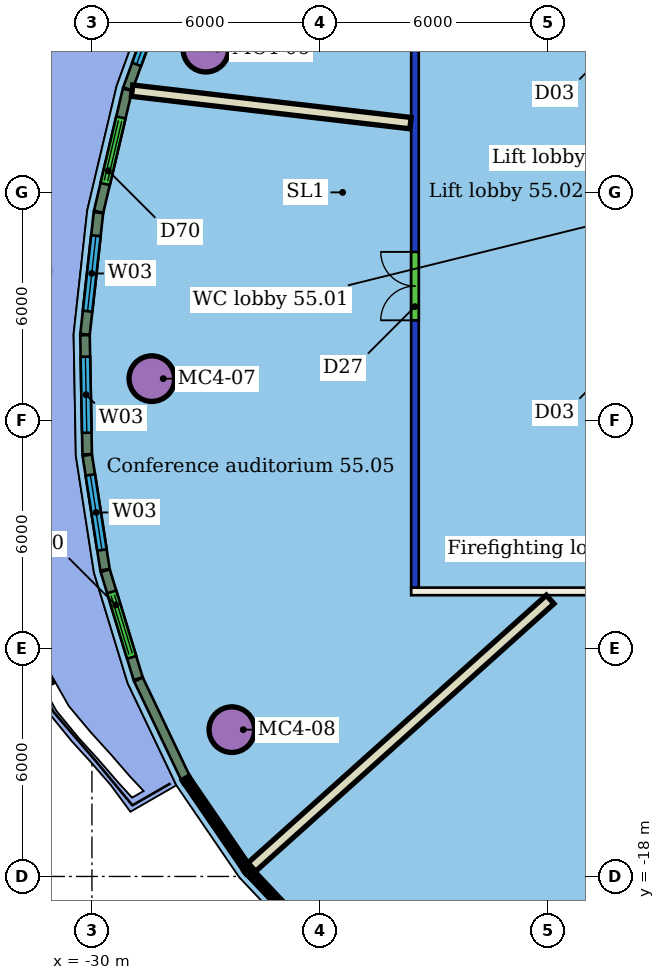
"""IFC4 building model, lengths in metres.
Left out: names, types, materials, properties, quantities, classifications, styles, units other than length and angle.
Written with IfcOpenShell. Run it as: python <this file> out.ifc"""

import sys

from ifc_helpers import new_model, si_unit, direction, frame, frame_2d, origin, origin_2d, place, context, subcontext, project, spatial, rectangle, hollow_circle, extrude, element, fill, save


model = new_model("IFC4")
c1 = context("Model", 3, precision=1e-05, world=origin(), true_north=direction((0.0, 1.0)))
c2 = subcontext(c1, "Body", "Model", "MODEL_VIEW")
j1 = project(units=[si_unit("LENGTHUNIT", "METRE"), si_unit("PLANEANGLEUNIT", "RADIAN")], contexts=[c1])
p1 = place(None, origin())
s1 = spatial("IfcSite", under=j1, at=p1, CompositionType="ELEMENT")
p2 = place(p1, origin())
s2 = spatial("IfcBuilding", under=s1, at=p2, CompositionType="ELEMENT")
p3 = place(p2, frame((0.0, 0.0, 224.5)))
s3 = spatial("IfcBuildingStorey", under=s2, at=p3, CompositionType="ELEMENT", Elevation=224.5)
for number, where, z_axis, x_axis in (
    (1, (-27.003, 3.768, 0.0), (0.0, 0.0, 1.0), (1.0, 0.0, 0.0)),
    (2, (-28.424, -4.901, 0.0), (0.0, 0.0, 1.0), (1.0, 0.0, 0.0)),
    (3, (-26.318, -14.137, 0.0), (0.0, 0.0, 1.0), (1.0, 0.0, 0.0)),
):
    element("IfcColumn", number, at=place(p3, frame(where, z_axis=z_axis, x_axis=x_axis)), inside=s3, PredefinedType="COLUMN", context=c2, shape_type="SweptSolid", body=[
        extrude(hollow_circle(Radius=0.6, WallThickness=0.045, at=origin_2d()), origin(), (0.0, 0.0, 1.0), 3.45),
    ])
p4 = place(p3, frame((9.6, -10.5, 0.0), z_axis=(0.0, 0.0, 1.0), x_axis=(-1.0, 0.0, 0.0)))
e4 = element("IfcWall", 4, at=p4, inside=s3, PredefinedType="PARTITIONING", context=c2, shape_type="SweptSolid", body=[
    extrude(rectangle(XDim=31.2, YDim=0.2, at=frame_2d((15.6, 0.0))), origin(), (0.0, 0.0, 1.0), 3.45),
])
p5 = place(p4, frame((18.197, 0.0, 0.0)))
e5 = element("IfcOpeningElement", 5, at=p5, cuts=e4, PredefinedType="OPENING", context=c2, shape_type="SweptSolid", body=[
    extrude(rectangle(XDim=1.8, YDim=2.1, at=frame_2d((0.9, 1.05))), frame((0.0, 0.11, 0.0), z_axis=(0.0, -1.0, 0.0), x_axis=(1.0, 0.0, 0.0)), (0.0, 0.0, 1.0), 0.22),
])
p6 = place(p4, frame((12.291, 0.0, 0.0)))
e6 = element("IfcOpeningElement", 6, at=p6, cuts=e4, PredefinedType="OPENING", context=c2, shape_type="SweptSolid", body=[
    extrude(rectangle(XDim=1.2, YDim=2.4, at=frame_2d((0.6, 1.2))), frame((0.0, 0.11, 0.0), z_axis=(0.0, -1.0, 0.0), x_axis=(1.0, 0.0, 0.0)), (0.0, 0.0, 1.0), 0.22),
])
p7 = place(p4, frame((9.324, 0.0, 0.0)))
e7 = element("IfcOpeningElement", 7, at=p7, cuts=e4, PredefinedType="OPENING", context=c2, shape_type="SweptSolid", body=[
    extrude(rectangle(XDim=1.0, YDim=2.4, at=frame_2d((0.5, 1.2))), frame((0.0, 0.11, 0.0), z_axis=(0.0, -1.0, 0.0), x_axis=(1.0, 0.0, 0.0)), (0.0, 0.0, 1.0), 0.22),
])
p8 = place(p4, frame((4.086, 0.0, 0.0)))
e8 = element("IfcOpeningElement", 8, at=p8, cuts=e4, PredefinedType="OPENING", context=c2, shape_type="SweptSolid", body=[
    extrude(rectangle(XDim=1.0, YDim=2.4, at=frame_2d((0.5, 1.2))), frame((0.0, 0.11, 0.0), z_axis=(0.0, -1.0, 0.0), x_axis=(1.0, 0.0, 0.0)), (0.0, 0.0, 1.0), 0.22),
])
p9 = place(p3, frame((-21.5, -10.4, 0.0), z_axis=(0.0, 0.0, 1.0), x_axis=(0.0, 1.0, 0.0)))
e9 = element("IfcWall", 9, at=p9, inside=s3, PredefinedType="PARTITIONING", context=c2, shape_type="SweptSolid", body=[
    extrude(rectangle(XDim=20.8, YDim=0.2, at=frame_2d((10.4, 0.0))), origin(), (0.0, 0.0, 1.0), 3.05),
])
p10 = place(p9, frame((14.754, 0.0, 0.0)))
e10 = element("IfcOpeningElement", 10, at=p10, cuts=e9, PredefinedType="OPENING", context=c2, shape_type="SweptSolid", body=[
    extrude(rectangle(XDim=1.0, YDim=2.4, at=frame_2d((0.5, 1.2))), frame((0.0, 0.11, 0.0), z_axis=(0.0, -1.0, 0.0), x_axis=(1.0, 0.0, 0.0)), (0.0, 0.0, 1.0), 0.22),
])
p11 = place(p9, frame((7.034, 0.0, 0.0)))
e11 = element("IfcOpeningElement", 11, at=p11, cuts=e9, PredefinedType="OPENING", context=c2, shape_type="SweptSolid", body=[
    extrude(rectangle(XDim=1.8, YDim=2.4, at=frame_2d((0.9, 1.2))), frame((0.0, 0.11, 0.0), z_axis=(0.0, -1.0, 0.0), x_axis=(1.0, 0.0, 0.0)), (0.0, 0.0, 1.0), 0.22),
])
p12 = place(p3, frame((-28.943, 2.676, 0.0), z_axis=(0.0, 0.0, 1.0), x_axis=(0.993265805872, -0.115857839117, 0.0)))
e12 = element("IfcWall", 12, at=p12, inside=s3, PredefinedType="PARTITIONING", context=c2, shape_type="SweptSolid", body=[
    extrude(rectangle(XDim=7.375, YDim=0.3, at=frame_2d((3.688, 0.0))), origin(), (0.0, 0.0, 1.0), 3.45),
])
p13 = place(p3, frame((-25.794, -17.754, 0.0), z_axis=(0.0, 0.0, 1.0), x_axis=(0.744431366547, 0.667698989441, 0.0)))
e13 = element("IfcWall", 13, at=p13, inside=s3, PredefinedType="PARTITIONING", context=c2, shape_type="SweptSolid", body=[
    extrude(rectangle(XDim=10.547, YDim=0.3, at=frame_2d((5.274, 0.0))), origin(), (0.0, 0.0, 1.0), 3.45),
])
p14 = place(p3, frame((-27.906, 5.89, 0.0), z_axis=(0.0, 0.0, 1.0), x_axis=(-0.341964011847, -0.939713049075, 0.0)))
e14 = element("IfcWall", 14, at=p14, inside=s3, PredefinedType="SOLIDWALL", context=c2, shape_type="SweptSolid", body=[
    extrude(rectangle(XDim=3.371, YDim=0.25, at=frame_2d((1.686, 0.0))), origin(), (0.0, 0.0, 1.0), 3.1),
])
p15 = place(p14, frame((0.686, 0.0, 0.9)))
e15 = element("IfcOpeningElement", 15, at=p15, cuts=e14, PredefinedType="OPENING", context=c2, shape_type="SweptSolid", body=[
    extrude(rectangle(XDim=2.0, YDim=2.1, at=frame_2d((1.0, 1.05))), frame((0.0, 0.135, 0.0), z_axis=(0.0, -1.0, 0.0), x_axis=(1.0, 0.0, 0.0)), (0.0, 0.0, 1.0), 0.27),
])
p16 = place(p3, frame((-29.066, 2.701, 0.0), z_axis=(0.0, 0.0, 1.0), x_axis=(-0.229983418088, -0.973194547562, 0.0)))
e16 = element("IfcWall", 16, at=p16, inside=s3, PredefinedType="SOLIDWALL", context=c2, shape_type="SweptSolid", body=[
    extrude(rectangle(XDim=3.3, YDim=0.25, at=frame_2d((1.65, 0.0))), origin(), (0.0, 0.0, 1.0), 3.1),
])
p17 = place(p16, frame((0.75, 0.0, 0.0)))
e17 = element("IfcOpeningElement", 17, at=p17, cuts=e16, PredefinedType="OPENING", context=c2, shape_type="SweptSolid", body=[
    extrude(rectangle(XDim=1.8, YDim=2.4, at=frame_2d((0.9, 1.2))), frame((0.0, 0.135, 0.0), z_axis=(0.0, -1.0, 0.0), x_axis=(1.0, 0.0, 0.0)), (0.0, 0.0, 1.0), 0.27),
])
p18 = place(p3, frame((-29.829, -0.534, 0.0), z_axis=(0.0, 0.0, 1.0), x_axis=(-0.10972407218, -0.993962085788, 0.0)))
e18 = element("IfcWall", 18, at=p18, inside=s3, PredefinedType="SOLIDWALL", context=c2, shape_type="SweptSolid", body=[
    extrude(rectangle(XDim=3.22, YDim=0.25, at=frame_2d((1.61, 0.0))), origin(), (0.0, 0.0, 1.0), 3.1),
])
p19 = place(p18, frame((0.61, 0.0, 0.9)))
e19 = element("IfcOpeningElement", 19, at=p19, cuts=e18, PredefinedType="OPENING", context=c2, shape_type="SweptSolid", body=[
    extrude(rectangle(XDim=2.0, YDim=2.1, at=frame_2d((1.0, 1.05))), frame((0.0, 0.135, 0.0), z_axis=(0.0, -1.0, 0.0), x_axis=(1.0, 0.0, 0.0)), (0.0, 0.0, 1.0), 0.27),
])
p20 = place(p3, frame((-30.183, -3.758, 0.0), z_axis=(0.0, 0.0, 1.0), x_axis=(0.018385546929, -0.999830971547, 0.0)))
e20 = element("IfcWall", 20, at=p20, inside=s3, PredefinedType="SOLIDWALL", context=c2, shape_type="SweptSolid", body=[
    extrude(rectangle(XDim=3.134, YDim=0.25, at=frame_2d((1.567, 0.0))), origin(), (0.0, 0.0, 1.0), 3.1),
])
p21 = place(p20, frame((0.567, 0.0, 0.9)))
e21 = element("IfcOpeningElement", 21, at=p21, cuts=e20, PredefinedType="OPENING", context=c2, shape_type="SweptSolid", body=[
    extrude(rectangle(XDim=2.0, YDim=2.1, at=frame_2d((1.0, 1.05))), frame((0.0, 0.135, 0.0), z_axis=(0.0, -1.0, 0.0), x_axis=(1.0, 0.0, 0.0)), (0.0, 0.0, 1.0), 0.27),
])
p22 = place(p3, frame((-30.123, -6.916, 0.0), z_axis=(0.0, 0.0, 1.0), x_axis=(0.15305011878, -0.98821842785, 0.0)))
e22 = element("IfcWall", 22, at=p22, inside=s3, PredefinedType="SOLIDWALL", context=c2, shape_type="SweptSolid", body=[
    extrude(rectangle(XDim=3.048, YDim=0.25, at=frame_2d((1.524, 0.0))), origin(), (0.0, 0.0, 1.0), 3.1),
])
p23 = place(p22, frame((0.524, 0.0, 0.9)))
e23 = element("IfcOpeningElement", 23, at=p23, cuts=e22, PredefinedType="OPENING", context=c2, shape_type="SweptSolid", body=[
    extrude(rectangle(XDim=2.0, YDim=2.1, at=frame_2d((1.0, 1.05))), frame((0.0, 0.135, 0.0), z_axis=(0.0, -1.0, 0.0), x_axis=(1.0, 0.0, 0.0)), (0.0, 0.0, 1.0), 0.27),
])
p24 = place(p3, frame((-29.651, -9.954, 0.0), z_axis=(0.0, 0.0, 1.0), x_axis=(0.291704653899, -0.956508439531, 0.0)))
e24 = element("IfcWall", 24, at=p24, inside=s3, PredefinedType="SOLIDWALL", context=c2, shape_type="SweptSolid", body=[
    extrude(rectangle(XDim=2.969, YDim=0.25, at=frame_2d((1.485, 0.0))), origin(), (0.0, 0.0, 1.0), 3.1),
])
p25 = place(p24, frame((0.585, 0.0, 0.0)))
e25 = element("IfcOpeningElement", 25, at=p25, cuts=e24, PredefinedType="OPENING", context=c2, shape_type="SweptSolid", body=[
    extrude(rectangle(XDim=1.8, YDim=2.4, at=frame_2d((0.9, 1.2))), frame((0.0, 0.135, 0.0), z_axis=(0.0, -1.0, 0.0), x_axis=(1.0, 0.0, 0.0)), (0.0, 0.0, 1.0), 0.27),
])
p26 = place(p3, frame((-28.775, -12.819, 0.0), z_axis=(0.0, 0.0, 1.0), x_axis=(0.430486422768, -0.902597052849, 0.0)))
e26 = element("IfcWall", 26, at=p26, inside=s3, PredefinedType="SOLIDWALL", context=c2, shape_type="SweptSolid", body=[
    extrude(rectangle(XDim=2.862, YDim=0.25, at=frame_2d((1.431, 0.0))), origin(), (0.0, 0.0, 1.0), 3.1),
])
p27 = place(p11, origin())
e27 = element("IfcDoor", 27, at=p27, inside=s3, OperationType="DOUBLE_DOOR_SINGLE_SWING", PredefinedType="DOOR", context=c2, shape_type="SweptSolid", body=[
    extrude(rectangle(XDim=1.8, YDim=2.4, at=frame_2d((0.9, 1.2))), frame((0.0, 0.025, 0.0), z_axis=(0.0, -1.0, 0.0), x_axis=(1.0, 0.0, 0.0)), (0.0, 0.0, 1.0), 0.05),
])
fill(e11, e27)
p28 = place(p15, origin())
e28 = element("IfcWindow", 28, at=p28, inside=s3, PartitioningType="SINGLE_PANEL", PredefinedType="WINDOW", context=c2, shape_type="SweptSolid", body=[
    extrude(rectangle(XDim=2.0, YDim=2.1, at=frame_2d((1.0, 1.05))), frame((0.0, 0.03, 0.0), z_axis=(0.0, -1.0, 0.0), x_axis=(1.0, 0.0, 0.0)), (0.0, 0.0, 1.0), 0.06),
])
fill(e15, e28)
p29 = place(p17, origin())
e29 = element("IfcDoor", 29, at=p29, inside=s3, OperationType="DOUBLE_DOOR_SLIDING", PredefinedType="DOOR", context=c2, shape_type="SweptSolid", body=[
    extrude(rectangle(XDim=1.8, YDim=2.4, at=frame_2d((0.9, 1.2))), frame((0.0, 0.025, 0.0), z_axis=(0.0, -1.0, 0.0), x_axis=(1.0, 0.0, 0.0)), (0.0, 0.0, 1.0), 0.05),
])
fill(e17, e29)
p30 = place(p19, origin())
e30 = element("IfcWindow", 30, at=p30, inside=s3, PartitioningType="SINGLE_PANEL", PredefinedType="WINDOW", context=c2, shape_type="SweptSolid", body=[
    extrude(rectangle(XDim=2.0, YDim=2.1, at=frame_2d((1.0, 1.05))), frame((0.0, 0.03, 0.0), z_axis=(0.0, -1.0, 0.0), x_axis=(1.0, 0.0, 0.0)), (0.0, 0.0, 1.0), 0.06),
])
fill(e19, e30)
p31 = place(p21, origin())
e31 = element("IfcWindow", 31, at=p31, inside=s3, PartitioningType="SINGLE_PANEL", PredefinedType="WINDOW", context=c2, shape_type="SweptSolid", body=[
    extrude(rectangle(XDim=2.0, YDim=2.1, at=frame_2d((1.0, 1.05))), frame((0.0, 0.03, 0.0), z_axis=(0.0, -1.0, 0.0), x_axis=(1.0, 0.0, 0.0)), (0.0, 0.0, 1.0), 0.06),
])
fill(e21, e31)
p32 = place(p23, origin())
e32 = element("IfcWindow", 32, at=p32, inside=s3, PartitioningType="SINGLE_PANEL", PredefinedType="WINDOW", context=c2, shape_type="SweptSolid", body=[
    extrude(rectangle(XDim=2.0, YDim=2.1, at=frame_2d((1.0, 1.05))), frame((0.0, 0.03, 0.0), z_axis=(0.0, -1.0, 0.0), x_axis=(1.0, 0.0, 0.0)), (0.0, 0.0, 1.0), 0.06),
])
fill(e23, e32)
p33 = place(p25, origin())
e33 = element("IfcDoor", 33, at=p33, inside=s3, OperationType="DOUBLE_DOOR_SLIDING", PredefinedType="DOOR", context=c2, shape_type="SweptSolid", body=[
    extrude(rectangle(XDim=1.8, YDim=2.4, at=frame_2d((0.9, 1.2))), frame((0.0, 0.025, 0.0), z_axis=(0.0, -1.0, 0.0), x_axis=(1.0, 0.0, 0.0)), (0.0, 0.0, 1.0), 0.05),
])
fill(e25, e33)
save(model, sys.argv[1])
